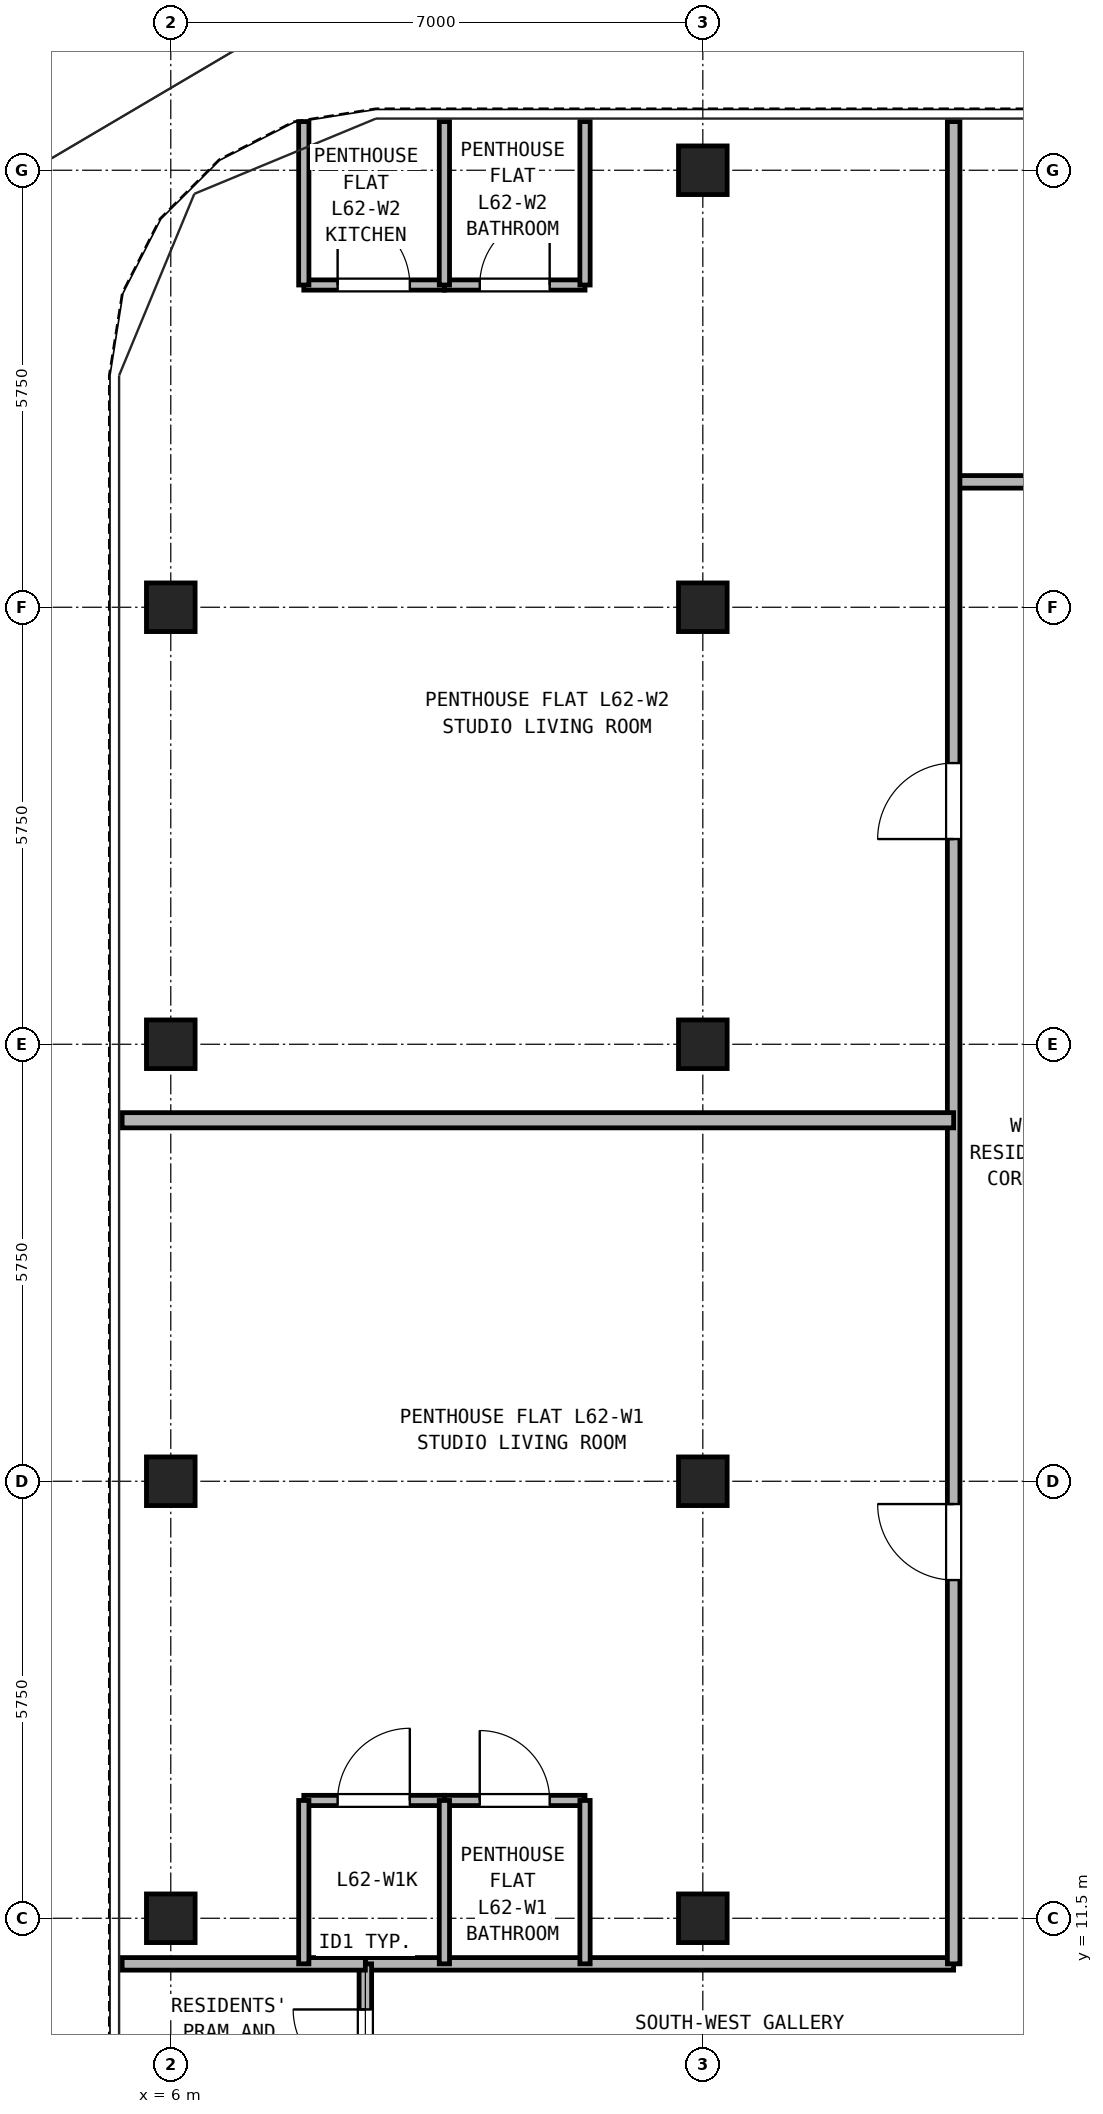
"""IFC4 building model, lengths in metres.
Left out: names, types, materials, properties, quantities, classifications, styles, units other than length and angle.
Written with IfcOpenShell. Run it as: python <this file> out.ifc"""

import sys

from ifc_helpers import new_model, si_unit, direction, frame, frame_2d, origin, origin_2d, place, context, subcontext, project, spatial, rectangle, hollow_rectangle, extrude, source, transform, mapped, element, fill, save


model = new_model("IFC4")
c1 = context("Model", 3, precision=1e-05, world=origin(), true_north=direction((0.0, 1.0)))
c2 = subcontext(c1, "Body", "Model", "MODEL_VIEW")
j1 = project(units=[si_unit("LENGTHUNIT", "METRE"), si_unit("PLANEANGLEUNIT", "RADIAN")], contexts=[c1])
p1 = place(None, origin())
s1 = spatial("IfcSite", under=j1, at=p1, CompositionType="ELEMENT")
p2 = place(p1, origin())
s2 = spatial("IfcBuilding", under=s1, at=p2, CompositionType="ELEMENT")
p3 = place(p2, frame((0.0, 0.0, 220.1)))
s3 = spatial("IfcBuildingStorey", under=s2, at=p3, CompositionType="ELEMENT", Elevation=220.1)
m1 = source(origin(), c2, "Body", "SweptSolid", [
    extrude(hollow_rectangle(XDim=0.64, YDim=0.64, WallThickness=0.035, at=origin_2d()), origin(), (0.0, 0.0, 1.0), 2.98),
])
for number, where, z_axis, x_axis in (
    (1, (13.0, 34.5, 0.0), (0.0, 0.0, 1.0), (1.0, 0.0, 0.0)),
    (2, (6.0, 11.5, 0.0), (0.0, 0.0, 1.0), (1.0, 0.0, 0.0)),
    (3, (6.0, 17.25, 0.0), (0.0, 0.0, 1.0), (1.0, 0.0, 0.0)),
    (4, (6.0, 23.0, 0.0), (0.0, 0.0, 1.0), (1.0, 0.0, 0.0)),
    (5, (6.0, 28.75, 0.0), (0.0, 0.0, 1.0), (1.0, 0.0, 0.0)),
    (6, (13.0, 11.5, 0.0), (0.0, 0.0, 1.0), (1.0, 0.0, 0.0)),
    (7, (13.0, 17.25, 0.0), (0.0, 0.0, 1.0), (1.0, 0.0, 0.0)),
    (8, (13.0, 23.0, 0.0), (0.0, 0.0, 1.0), (1.0, 0.0, 0.0)),
    (9, (13.0, 28.75, 0.0), (0.0, 0.0, 1.0), (1.0, 0.0, 0.0)),
):
    element("IfcColumn", number, at=place(p3, frame(where, z_axis=z_axis, x_axis=x_axis)), inside=s3, PredefinedType="COLUMN", context=c2, shape_type="MappedRepresentation", body=[
        mapped(m1, transform((0.0, 0.0, 0.0), x_axis=(1.0, 0.0, 0.0), y_axis=(0.0, 1.0, 0.0), z_axis=(0.0, 0.0, 1.0), scale=1.0)),
    ])
p4 = place(p3, frame((8.56, 10.9, 0.0), z_axis=(0.0, 0.0, 1.0), x_axis=(1.0, 0.0, 0.0)))
e10 = element("IfcWall", 10, at=p4, inside=s3, PredefinedType="PARTITIONING", context=c2, shape_type="SweptSolid", body=[
    extrude(rectangle(XDim=7.74, YDim=0.165, at=frame_2d((3.87, 0.0))), origin(), (0.0, 0.0, 1.0), 2.98),
])
p5 = place(p3, frame((8.56, 8.9, 0.0), z_axis=(0.0, 0.0, 1.0), x_axis=(0.0, 1.0, 0.0)))
e11 = element("IfcWall", 11, at=p5, inside=s3, PredefinedType="PARTITIONING", context=c2, shape_type="SweptSolid", body=[
    extrude(rectangle(XDim=2.0, YDim=0.165, at=frame_2d((1.0, 0.0))), origin(), (0.0, 0.0, 1.0), 2.98),
])
p6 = place(p5, frame((0.45, 0.0, 0.0)))
e12 = element("IfcOpeningElement", 12, at=p6, cuts=e11, PredefinedType="OPENING", context=c2, shape_type="SweptSolid", body=[
    extrude(rectangle(XDim=0.95, YDim=2.15, at=frame_2d((0.475, 1.075))), frame((0.0, 0.093, 0.0), z_axis=(0.0, -1.0, 0.0), x_axis=(1.0, 0.0, 0.0)), (0.0, 0.0, 1.0), 0.185),
])
p7 = place(p3, frame((16.3, 30.4, 0.0), z_axis=(0.0, 0.0, 1.0), x_axis=(1.0, 0.0, 0.0)))
e13 = element("IfcWall", 13, at=p7, inside=s3, PredefinedType="PARTITIONING", context=c2, shape_type="SweptSolid", body=[
    extrude(rectangle(XDim=14.4, YDim=0.165, at=frame_2d((7.2, 0.0))), origin(), (0.0, 0.0, 1.0), 2.98),
])
p8 = place(p7, frame((2.35, 0.0, 0.0)))
e14 = element("IfcOpeningElement", 14, at=p8, cuts=e13, PredefinedType="OPENING", context=c2, shape_type="SweptSolid", body=[
    extrude(rectangle(XDim=0.95, YDim=2.15, at=frame_2d((0.475, 1.075))), frame((0.0, 0.093, 0.0), z_axis=(0.0, -1.0, 0.0), x_axis=(1.0, 0.0, 0.0)), (0.0, 0.0, 1.0), 0.185),
])
p9 = place(p7, frame((7.25, 0.0, 0.0)))
e15 = element("IfcOpeningElement", 15, at=p9, cuts=e13, PredefinedType="OPENING", context=c2, shape_type="SweptSolid", body=[
    extrude(rectangle(XDim=0.95, YDim=2.15, at=frame_2d((0.475, 1.075))), frame((0.0, 0.093, 0.0), z_axis=(0.0, -1.0, 0.0), x_axis=(1.0, 0.0, 0.0)), (0.0, 0.0, 1.0), 0.185),
])
p10 = place(p7, frame((11.6, 0.0, 0.0)))
e16 = element("IfcOpeningElement", 16, at=p10, cuts=e13, PredefinedType="OPENING", context=c2, shape_type="SweptSolid", body=[
    extrude(rectangle(XDim=0.92, YDim=2.1, at=frame_2d((0.46, 1.05))), frame((0.0, 0.093, 0.0), z_axis=(0.0, -1.0, 0.0), x_axis=(1.0, 0.0, 0.0)), (0.0, 0.0, 1.0), 0.185),
])
p11 = place(p3, frame((16.3, 10.9, 0.0), z_axis=(0.0, 0.0, 1.0), x_axis=(0.0, 1.0, 0.0)))
e17 = element("IfcWall", 17, at=p11, inside=s3, PredefinedType="PARTITIONING", context=c2, shape_type="SweptSolid", body=[
    extrude(rectangle(XDim=24.24, YDim=0.165, at=frame_2d((12.12, 0.0))), origin(), (0.0, 0.0, 1.0), 2.98),
])
p12 = place(p11, frame((5.05, 0.0, 0.0)))
e18 = element("IfcOpeningElement", 18, at=p12, cuts=e17, PredefinedType="OPENING", context=c2, shape_type="SweptSolid", body=[
    extrude(rectangle(XDim=1.0, YDim=2.15, at=frame_2d((0.5, 1.075))), frame((0.0, 0.093, 0.0), z_axis=(0.0, -1.0, 0.0), x_axis=(1.0, 0.0, 0.0)), (0.0, 0.0, 1.0), 0.185),
])
p13 = place(p11, frame((14.8, 0.0, 0.0)))
e19 = element("IfcOpeningElement", 19, at=p13, cuts=e17, PredefinedType="OPENING", context=c2, shape_type="SweptSolid", body=[
    extrude(rectangle(XDim=1.0, YDim=2.15, at=frame_2d((0.5, 1.075))), frame((0.0, 0.093, 0.0), z_axis=(0.0, -1.0, 0.0), x_axis=(1.0, 0.0, 0.0)), (0.0, 0.0, 1.0), 0.185),
])
p14 = place(p3, frame((5.36, 10.9, 0.0), z_axis=(0.0, 0.0, 1.0), x_axis=(1.0, 0.0, 0.0)))
e20 = element("IfcWall", 20, at=p14, inside=s3, PredefinedType="PARTITIONING", context=c2, shape_type="SweptSolid", body=[
    extrude(rectangle(XDim=3.2, YDim=0.165, at=frame_2d((1.6, 0.0))), origin(), (0.0, 0.0, 1.0), 2.98),
])
p15 = place(p3, frame((7.75, 13.05, 0.0), z_axis=(0.0, 0.0, 1.0), x_axis=(1.0, 0.0, 0.0)))
e21 = element("IfcWall", 21, at=p15, inside=s3, PredefinedType="PARTITIONING", context=c2, shape_type="SweptSolid", body=[
    extrude(rectangle(XDim=1.85, YDim=0.135, at=frame_2d((0.925, 0.0))), origin(), (0.0, 0.0, 1.0), 2.98),
])
p16 = place(p15, frame((0.445, 0.0, 0.0)))
e22 = element("IfcOpeningElement", 22, at=p16, cuts=e21, PredefinedType="OPENING", context=c2, shape_type="SweptSolid", body=[
    extrude(rectangle(XDim=0.95, YDim=2.15, at=frame_2d((0.475, 1.075))), frame((0.0, 0.077, 0.0), z_axis=(0.0, -1.0, 0.0), x_axis=(1.0, 0.0, 0.0)), (0.0, 0.0, 1.0), 0.155),
])
p17 = place(p3, frame((9.6, 13.05, 0.0), z_axis=(0.0, 0.0, 1.0), x_axis=(1.0, 0.0, 0.0)))
e23 = element("IfcWall", 23, at=p17, inside=s3, PredefinedType="PARTITIONING", context=c2, shape_type="SweptSolid", body=[
    extrude(rectangle(XDim=1.85, YDim=0.135, at=frame_2d((0.925, 0.0))), origin(), (0.0, 0.0, 1.0), 2.98),
])
p18 = place(p17, frame((0.465, 0.0, 0.0)))
e24 = element("IfcOpeningElement", 24, at=p18, cuts=e23, PredefinedType="OPENING", context=c2, shape_type="SweptSolid", body=[
    extrude(rectangle(XDim=0.92, YDim=2.1, at=frame_2d((0.46, 1.05))), frame((0.0, 0.077, 0.0), z_axis=(0.0, -1.0, 0.0), x_axis=(1.0, 0.0, 0.0)), (0.0, 0.0, 1.0), 0.155),
])
for number, where, z_axis, x_axis in (
    (25, (7.75, 10.9, 0.0), (0.0, 0.0, 1.0), (0.0, 1.0, 0.0)),
    (26, (9.6, 10.9, 0.0), (0.0, 0.0, 1.0), (0.0, 1.0, 0.0)),
    (27, (11.45, 10.9, 0.0), (0.0, 0.0, 1.0), (0.0, 1.0, 0.0)),
):
    element("IfcWall", number, at=place(p3, frame(where, z_axis=z_axis, x_axis=x_axis)), inside=s3, PredefinedType="PARTITIONING", context=c2, shape_type="SweptSolid", body=[
        extrude(rectangle(XDim=2.15, YDim=0.135, at=frame_2d((1.075, 0.0))), origin(), (0.0, 0.0, 1.0), 2.98),
    ])
p19 = place(p3, frame((5.36, 22.0, 0.0), z_axis=(0.0, 0.0, 1.0), x_axis=(1.0, 0.0, 0.0)))
e28 = element("IfcWall", 28, at=p19, inside=s3, PredefinedType="PARTITIONING", context=c2, shape_type="SweptSolid", body=[
    extrude(rectangle(XDim=10.94, YDim=0.2, at=frame_2d((5.47, 0.0))), origin(), (0.0, 0.0, 1.0), 2.98),
])
p20 = place(p3, frame((7.75, 32.99, 0.0), z_axis=(0.0, 0.0, 1.0), x_axis=(1.0, 0.0, 0.0)))
e29 = element("IfcWall", 29, at=p20, inside=s3, PredefinedType="PARTITIONING", context=c2, shape_type="SweptSolid", body=[
    extrude(rectangle(XDim=1.85, YDim=0.135, at=frame_2d((0.925, 0.0))), origin(), (0.0, 0.0, 1.0), 2.98),
])
p21 = place(p20, frame((0.445, 0.0, 0.0)))
e30 = element("IfcOpeningElement", 30, at=p21, cuts=e29, PredefinedType="OPENING", context=c2, shape_type="SweptSolid", body=[
    extrude(rectangle(XDim=0.95, YDim=2.15, at=frame_2d((0.475, 1.075))), frame((0.0, 0.077, 0.0), z_axis=(0.0, -1.0, 0.0), x_axis=(1.0, 0.0, 0.0)), (0.0, 0.0, 1.0), 0.155),
])
p22 = place(p3, frame((9.6, 32.99, 0.0), z_axis=(0.0, 0.0, 1.0), x_axis=(1.0, 0.0, 0.0)))
e31 = element("IfcWall", 31, at=p22, inside=s3, PredefinedType="PARTITIONING", context=c2, shape_type="SweptSolid", body=[
    extrude(rectangle(XDim=1.85, YDim=0.135, at=frame_2d((0.925, 0.0))), origin(), (0.0, 0.0, 1.0), 2.98),
])
p23 = place(p22, frame((0.465, 0.0, 0.0)))
e32 = element("IfcOpeningElement", 32, at=p23, cuts=e31, PredefinedType="OPENING", context=c2, shape_type="SweptSolid", body=[
    extrude(rectangle(XDim=0.92, YDim=2.1, at=frame_2d((0.46, 1.05))), frame((0.0, 0.077, 0.0), z_axis=(0.0, -1.0, 0.0), x_axis=(1.0, 0.0, 0.0)), (0.0, 0.0, 1.0), 0.155),
])
for number, where, z_axis, x_axis in (
    (33, (7.75, 32.99, 0.0), (0.0, 0.0, 1.0), (0.0, 1.0, 0.0)),
    (34, (9.6, 32.99, 0.0), (0.0, 0.0, 1.0), (0.0, 1.0, 0.0)),
    (35, (11.45, 32.99, 0.0), (0.0, 0.0, 1.0), (0.0, 1.0, 0.0)),
):
    element("IfcWall", number, at=place(p3, frame(where, z_axis=z_axis, x_axis=x_axis)), inside=s3, PredefinedType="PARTITIONING", context=c2, shape_type="SweptSolid", body=[
        extrude(rectangle(XDim=2.15, YDim=0.135, at=frame_2d((1.075, 0.0))), origin(), (0.0, 0.0, 1.0), 2.98),
    ])
p24 = place(p6, frame((0.95, 0.0, 0.0), z_axis=(0.0, 0.0, 1.0), x_axis=(-1.0, 0.0, 0.0)))
e36 = element("IfcDoor", 36, at=p24, inside=s3, OperationType="SINGLE_SWING_RIGHT", PredefinedType="DOOR", context=c2, shape_type="SweptSolid", body=[
    extrude(rectangle(XDim=0.95, YDim=2.15, at=frame_2d((0.475, 1.075))), frame((0.0, 0.025, 0.0), z_axis=(0.0, -1.0, 0.0), x_axis=(1.0, 0.0, 0.0)), (0.0, 0.0, 1.0), 0.05),
])
fill(e12, e36)
p25 = place(p16, origin())
e37 = element("IfcDoor", 37, at=p25, inside=s3, OperationType="SINGLE_SWING_RIGHT", PredefinedType="DOOR", context=c2, shape_type="SweptSolid", body=[
    extrude(rectangle(XDim=0.95, YDim=2.15, at=frame_2d((0.475, 1.075))), frame((0.0, 0.025, 0.0), z_axis=(0.0, -1.0, 0.0), x_axis=(1.0, 0.0, 0.0)), (0.0, 0.0, 1.0), 0.05),
])
fill(e22, e37)
p26 = place(p18, origin())
e38 = element("IfcDoor", 38, at=p26, inside=s3, OperationType="SINGLE_SWING_LEFT", PredefinedType="DOOR", context=c2, shape_type="SweptSolid", body=[
    extrude(rectangle(XDim=0.92, YDim=2.1, at=frame_2d((0.46, 1.05))), frame((0.0, 0.025, 0.0), z_axis=(0.0, -1.0, 0.0), x_axis=(1.0, 0.0, 0.0)), (0.0, 0.0, 1.0), 0.05),
])
fill(e24, e38)
p27 = place(p12, origin())
e39 = element("IfcDoor", 39, at=p27, inside=s3, OperationType="SINGLE_SWING_RIGHT", PredefinedType="DOOR", context=c2, shape_type="SweptSolid", body=[
    extrude(rectangle(XDim=1.0, YDim=2.15, at=frame_2d((0.5, 1.075))), frame((0.0, 0.025, 0.0), z_axis=(0.0, -1.0, 0.0), x_axis=(1.0, 0.0, 0.0)), (0.0, 0.0, 1.0), 0.05),
])
fill(e18, e39)
p28 = place(p21, frame((0.95, 0.0, 0.0), z_axis=(0.0, 0.0, 1.0), x_axis=(-1.0, 0.0, 0.0)))
e40 = element("IfcDoor", 40, at=p28, inside=s3, OperationType="SINGLE_SWING_LEFT", PredefinedType="DOOR", context=c2, shape_type="SweptSolid", body=[
    extrude(rectangle(XDim=0.95, YDim=2.15, at=frame_2d((0.475, 1.075))), frame((0.0, 0.025, 0.0), z_axis=(0.0, -1.0, 0.0), x_axis=(1.0, 0.0, 0.0)), (0.0, 0.0, 1.0), 0.05),
])
fill(e30, e40)
p29 = place(p23, frame((0.92, 0.0, 0.0), z_axis=(0.0, 0.0, 1.0), x_axis=(-1.0, 0.0, 0.0)))
e41 = element("IfcDoor", 41, at=p29, inside=s3, OperationType="SINGLE_SWING_RIGHT", PredefinedType="DOOR", context=c2, shape_type="SweptSolid", body=[
    extrude(rectangle(XDim=0.92, YDim=2.1, at=frame_2d((0.46, 1.05))), frame((0.0, 0.025, 0.0), z_axis=(0.0, -1.0, 0.0), x_axis=(1.0, 0.0, 0.0)), (0.0, 0.0, 1.0), 0.05),
])
fill(e32, e41)
p30 = place(p13, origin())
e42 = element("IfcDoor", 42, at=p30, inside=s3, OperationType="SINGLE_SWING_LEFT", PredefinedType="DOOR", context=c2, shape_type="SweptSolid", body=[
    extrude(rectangle(XDim=1.0, YDim=2.15, at=frame_2d((0.5, 1.075))), frame((0.0, 0.025, 0.0), z_axis=(0.0, -1.0, 0.0), x_axis=(1.0, 0.0, 0.0)), (0.0, 0.0, 1.0), 0.05),
])
fill(e19, e42)
save(model, sys.argv[1])
